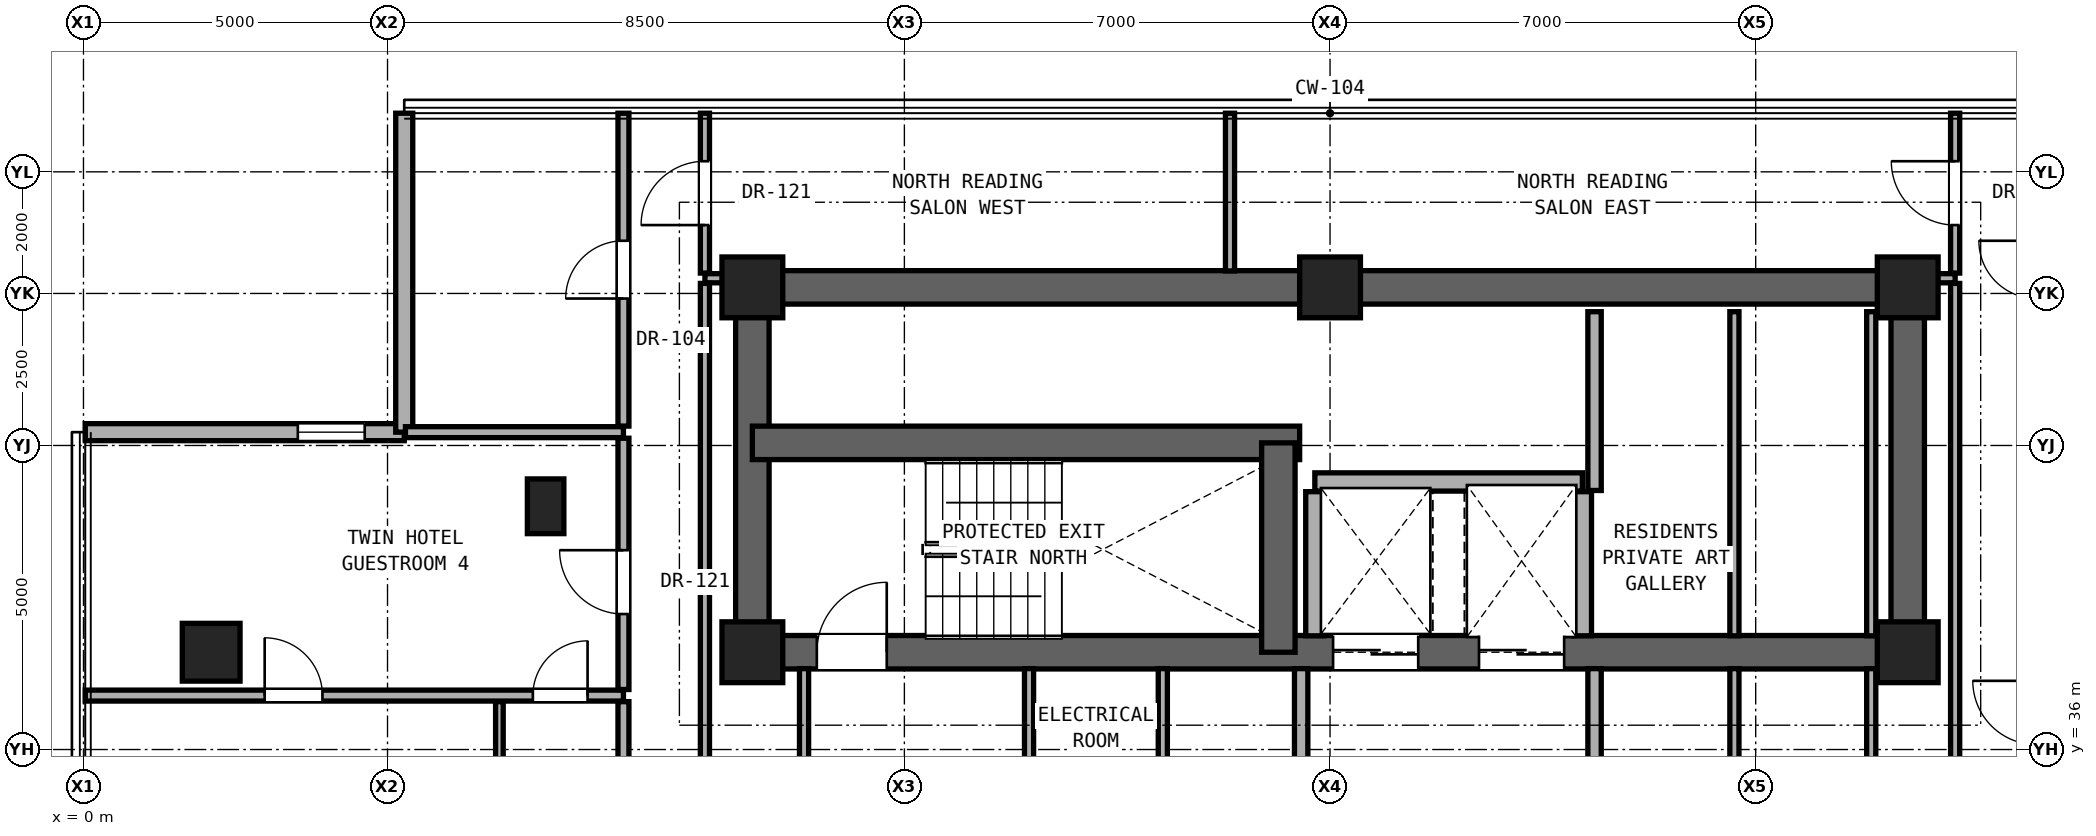
"""IFC4 building model, lengths in metres.
Left out: names, types, materials, properties, quantities, classifications, styles, units other than length and angle.
Written with IfcOpenShell. Run it as: python <this file> out.ifc"""

import sys

from ifc_helpers import new_model, si_unit, direction, frame, frame_2d, origin, origin_2d, place, context, subcontext, project, spatial, rectangle, hollow_rectangle, extrude, element, fill, save


model = new_model("IFC4")
c1 = context("Model", 3, precision=1e-05, world=origin(), true_north=direction((0.0, 1.0)))
c2 = subcontext(c1, "Body", "Model", "MODEL_VIEW")
j1 = project(units=[si_unit("LENGTHUNIT", "METRE"), si_unit("PLANEANGLEUNIT", "RADIAN")], contexts=[c1])
p1 = place(None, origin())
s1 = spatial("IfcSite", under=j1, at=p1, CompositionType="ELEMENT")
p2 = place(p1, origin())
s2 = spatial("IfcBuilding", under=s1, at=p2, CompositionType="ELEMENT")
p3 = place(p2, frame((0.0, 0.0, 164.15)))
s3 = spatial("IfcBuildingStorey", under=s2, at=p3, CompositionType="ELEMENT", Elevation=164.15)
for number, where, z_axis, x_axis in (
    (1, (11.0, 37.6, 0.0), (0.0, 0.0, 1.0), (1.0, 0.0, 0.0)),
    (2, (30.0, 37.6, 0.0), (0.0, 0.0, 1.0), (1.0, 0.0, 0.0)),
    (3, (11.0, 43.6, 0.0), (0.0, 0.0, 1.0), (1.0, 0.0, 0.0)),
    (4, (20.5, 43.6, 0.0), (0.0, 0.0, 1.0), (1.0, 0.0, 0.0)),
    (5, (30.0, 43.6, 0.0), (0.0, 0.0, 1.0), (1.0, 0.0, 0.0)),
):
    element("IfcColumn", number, at=place(p3, frame(where, z_axis=z_axis, x_axis=x_axis)), inside=s3, PredefinedType="COLUMN", context=c2, shape_type="SweptSolid", body=[
        extrude(rectangle(XDim=1.0, YDim=1.0, at=origin_2d()), origin(), (0.0, 0.0, 1.0), 3.25),
    ])
p4 = place(p3, frame((2.1, 37.6, 0.0), z_axis=(0.0, 0.0, 1.0), x_axis=(1.0, 0.0, 0.0)))
e6 = element("IfcColumn", 6, at=p4, inside=s3, PredefinedType="COLUMN", context=c2, shape_type="SweptSolid", body=[
    extrude(hollow_rectangle(XDim=0.95, YDim=0.95, WallThickness=0.05, at=origin_2d()), origin(), (0.0, 0.0, 1.0), 3.25),
])
p5 = place(p3, frame((7.6, 40.0, 0.0), z_axis=(0.0, 0.0, 1.0), x_axis=(1.0, 0.0, 0.0)))
e7 = element("IfcColumn", 7, at=p5, inside=s3, PredefinedType="PILASTER", context=c2, shape_type="SweptSolid", body=[
    extrude(rectangle(XDim=0.6, YDim=0.9, at=origin_2d()), origin(), (0.0, 0.0, 1.0), 3.25),
])
p6 = place(p3, frame((11.0, 43.6, 0.0), z_axis=(0.0, 0.0, 1.0), x_axis=(1.0, 0.0, 0.0)))
e8 = element("IfcWall", 8, at=p6, inside=s3, PredefinedType="SHEAR", context=c2, shape_type="SweptSolid", body=[
    extrude(rectangle(XDim=19.0, YDim=0.55, at=frame_2d((9.5, 0.0))), origin(), (0.0, 0.0, 1.0), 3.05),
])
for number, where, z_axis, x_axis in (
    (9, (11.0, 37.6, 0.0), (0.0, 0.0, 1.0), (0.0, 1.0, 0.0)),
    (10, (30.0, 37.6, 0.0), (0.0, 0.0, 1.0), (0.0, 1.0, 0.0)),
):
    element("IfcWall", number, at=place(p3, frame(where, z_axis=z_axis, x_axis=x_axis)), inside=s3, PredefinedType="SHEAR", context=c2, shape_type="SweptSolid", body=[
        extrude(rectangle(XDim=6.0, YDim=0.55, at=frame_2d((3.0, 0.0))), origin(), (0.0, 0.0, 1.0), 3.05),
    ])
p7 = place(p3, frame((11.0, 37.6, 0.0), z_axis=(0.0, 0.0, 1.0), x_axis=(1.0, 0.0, 0.0)))
e11 = element("IfcWall", 11, at=p7, inside=s3, PredefinedType="SHEAR", context=c2, shape_type="SweptSolid", body=[
    extrude(rectangle(XDim=19.0, YDim=0.55, at=frame_2d((9.5, 0.0))), origin(), (0.0, 0.0, 1.0), 3.05),
])
p8 = place(p7, frame((1.06, 0.0, 0.0)))
e12 = element("IfcOpeningElement", 12, at=p8, cuts=e11, PredefinedType="OPENING", context=c2, shape_type="SweptSolid", body=[
    extrude(rectangle(XDim=1.15, YDim=2.2, at=frame_2d((0.575, 1.1))), frame((0.0, 0.285, 0.0), z_axis=(0.0, -1.0, 0.0), x_axis=(1.0, 0.0, 0.0)), (0.0, 0.0, 1.0), 0.57),
])
p9 = place(p7, frame((9.55, 0.0, 0.0)))
e13 = element("IfcOpeningElement", 13, at=p9, cuts=e11, PredefinedType="OPENING", context=c2, shape_type="SweptSolid", body=[
    extrude(rectangle(XDim=1.4, YDim=2.35, at=frame_2d((0.7, 1.175))), frame((0.0, 0.285, 0.0), z_axis=(0.0, -1.0, 0.0), x_axis=(1.0, 0.0, 0.0)), (0.0, 0.0, 1.0), 0.57),
])
p10 = place(p7, frame((11.95, 0.0, 0.0)))
e14 = element("IfcOpeningElement", 14, at=p10, cuts=e11, PredefinedType="OPENING", context=c2, shape_type="SweptSolid", body=[
    extrude(rectangle(XDim=1.4, YDim=2.35, at=frame_2d((0.7, 1.175))), frame((0.0, 0.285, 0.0), z_axis=(0.0, -1.0, 0.0), x_axis=(1.0, 0.0, 0.0)), (0.0, 0.0, 1.0), 0.57),
])
p11 = place(p3, frame((11.0, 41.043, 0.0), z_axis=(0.0, 0.0, 1.0), x_axis=(1.0, 0.0, 0.0)))
e15 = element("IfcWall", 15, at=p11, inside=s3, PredefinedType="SHEAR", context=c2, shape_type="SweptSolid", body=[
    extrude(rectangle(XDim=9.0, YDim=0.55, at=frame_2d((4.5, 0.0))), origin(), (0.0, 0.0, 1.0), 3.05),
])
p12 = place(p3, frame((19.65, 37.6, 0.0), z_axis=(0.0, 0.0, 1.0), x_axis=(0.0, 1.0, 0.0)))
e16 = element("IfcWall", 16, at=p12, inside=s3, PredefinedType="SHEAR", context=c2, shape_type="SweptSolid", body=[
    extrude(rectangle(XDim=3.443, YDim=0.55, at=frame_2d((1.721, 0.0))), origin(), (0.0, 0.0, 1.0), 3.05),
])
p13 = place(p3, frame((5.275, 41.219, 0.0), z_axis=(0.0, 0.0, 1.0), x_axis=(-1.0, 0.0, 0.0)))
e17 = element("IfcWall", 17, at=p13, inside=s3, PredefinedType="SOLIDWALL", context=c2, shape_type="SweptSolid", body=[
    extrude(rectangle(XDim=5.245, YDim=0.28, at=frame_2d((2.623, 0.0))), origin(), (0.0, 0.0, 1.0), 3.03),
])
p14 = place(p13, frame((0.65, 0.0, 0.85)))
e18 = element("IfcOpeningElement", 18, at=p14, cuts=e17, PredefinedType="OPENING", context=c2, shape_type="SweptSolid", body=[
    extrude(rectangle(XDim=1.1, YDim=2.0, at=frame_2d((0.55, 1.0))), frame((0.0, 0.15, 0.0), z_axis=(0.0, -1.0, 0.0), x_axis=(1.0, 0.0, 0.0)), (0.0, 0.0, 1.0), 0.3),
])
p15 = place(p3, frame((5.275, 46.464, 0.0), z_axis=(0.0, 0.0, 1.0), x_axis=(0.0, -1.0, 0.0)))
e19 = element("IfcWall", 19, at=p15, inside=s3, PredefinedType="SOLIDWALL", context=c2, shape_type="SweptSolid", body=[
    extrude(rectangle(XDim=5.245, YDim=0.28, at=frame_2d((2.623, 0.0))), origin(), (0.0, 0.0, 1.0), 3.03),
])
p16 = place(p3, frame((0.03, 36.887, 0.0), z_axis=(0.0, 0.0, 1.0), x_axis=(1.0, 0.0, 0.0)))
e20 = element("IfcWall", 20, at=p16, inside=s3, PredefinedType="PARTITIONING", context=c2, shape_type="SweptSolid", body=[
    extrude(rectangle(XDim=8.85, YDim=0.18, at=frame_2d((4.425, 0.0))), origin(), (0.0, 0.0, 1.0), 2.269),
])
p17 = place(p16, frame((2.95, 0.0, 0.0)))
e21 = element("IfcOpeningElement", 21, at=p17, cuts=e20, PredefinedType="OPENING", context=c2, shape_type="SweptSolid", body=[
    extrude(rectangle(XDim=0.95, YDim=2.15, at=frame_2d((0.475, 1.075))), frame((0.0, 0.1, 0.0), z_axis=(0.0, -1.0, 0.0), x_axis=(1.0, 0.0, 0.0)), (0.0, 0.0, 1.0), 0.2),
])
p18 = place(p16, frame((7.36, 0.0, 0.0)))
e22 = element("IfcOpeningElement", 22, at=p18, cuts=e20, PredefinedType="OPENING", context=c2, shape_type="SweptSolid", body=[
    extrude(rectangle(XDim=0.9, YDim=2.1, at=frame_2d((0.45, 1.05))), frame((0.0, 0.1, 0.0), z_axis=(0.0, -1.0, 0.0), x_axis=(1.0, 0.0, 0.0)), (0.0, 0.0, 1.0), 0.2),
])
p19 = place(p3, frame((20.25, 40.4, 0.0), z_axis=(0.0, 0.0, 1.0), x_axis=(1.0, 0.0, 0.0)))
e23 = element("IfcWall", 23, at=p19, inside=s3, PredefinedType="SOLIDWALL", context=c2, shape_type="SweptSolid", body=[
    extrude(rectangle(XDim=4.4, YDim=0.3, at=frame_2d((2.2, 0.0))), origin(), (0.0, 0.0, 1.0), 3.05),
])
p20 = place(p3, frame((5.295, 41.219, 0.0), z_axis=(0.0, 0.0, 1.0), x_axis=(1.0, 0.0, 0.0)))
e24 = element("IfcWall", 24, at=p20, inside=s3, PredefinedType="PARTITIONING", context=c2, shape_type="SweptSolid", body=[
    extrude(rectangle(XDim=3.585, YDim=0.18, at=frame_2d((1.792, 0.0))), origin(), (0.0, 0.0, 1.0), 3.05),
])
for number, where, z_axis, x_axis in (
    (25, (10.22, 43.75, 0.0), (0.0, 0.0, 1.0), (1.0, 0.0, 0.0)),
    (26, (30.27, 43.75, 0.0), (0.0, 0.0, 1.0), (1.0, 0.0, 0.0)),
):
    element("IfcWall", number, at=place(p3, frame(where, z_axis=z_axis, x_axis=x_axis)), inside=s3, PredefinedType="PARTITIONING", context=c2, shape_type="SweptSolid", body=[
        extrude(rectangle(XDim=0.51, YDim=0.15, at=frame_2d((0.255, 0.0))), origin(), (0.0, 0.0, 1.0), 3.05),
    ])
p21 = place(p3, frame((6.84, 34.267, 0.0), z_axis=(0.0, 0.0, 1.0), x_axis=(0.0, 1.0, 0.0)))
e27 = element("IfcWall", 27, at=p21, inside=s3, PredefinedType="PARTITIONING", context=c2, shape_type="SweptSolid", body=[
    extrude(rectangle(XDim=2.52, YDim=0.125, at=frame_2d((1.26, 0.0))), origin(), (0.0, 0.0, 1.0), 3.05),
])
p22 = place(p3, frame((8.88, 34.267, 0.0), z_axis=(0.0, 0.0, 1.0), x_axis=(0.0, 1.0, 0.0)))
e28 = element("IfcWall", 28, at=p22, inside=s3, PredefinedType="PARTITIONING", context=c2, shape_type="SweptSolid", body=[
    extrude(rectangle(XDim=2.52, YDim=0.18, at=frame_2d((1.26, 0.0))), origin(), (0.0, 0.0, 1.0), 3.05),
])
p23 = place(p3, frame((8.88, 36.987, 0.0), z_axis=(0.0, 0.0, 1.0), x_axis=(0.0, 1.0, 0.0)))
e29 = element("IfcWall", 29, at=p23, inside=s3, PredefinedType="PARTITIONING", context=c2, shape_type="SweptSolid", body=[
    extrude(rectangle(XDim=4.132, YDim=0.18, at=frame_2d((2.066, 0.0))), origin(), (0.0, 0.0, 1.0), 2.442),
])
p24 = place(p23, frame((1.241, 0.0, 0.0)))
e30 = element("IfcOpeningElement", 30, at=p24, cuts=e29, PredefinedType="OPENING", context=c2, shape_type="SweptSolid", body=[
    extrude(rectangle(XDim=1.05, YDim=2.2, at=frame_2d((0.525, 1.1))), frame((0.0, 0.1, 0.0), z_axis=(0.0, -1.0, 0.0), x_axis=(1.0, 0.0, 0.0)), (0.0, 0.0, 1.0), 0.2),
])
p25 = place(p3, frame((8.88, 41.319, 0.0), z_axis=(0.0, 0.0, 1.0), x_axis=(0.0, 1.0, 0.0)))
e31 = element("IfcWall", 31, at=p25, inside=s3, PredefinedType="PARTITIONING", context=c2, shape_type="SweptSolid", body=[
    extrude(rectangle(XDim=5.145, YDim=0.18, at=frame_2d((2.573, 0.0))), origin(), (0.0, 0.0, 1.0), 3.05),
])
p26 = place(p25, frame((2.097, 0.0, 0.0)))
e32 = element("IfcOpeningElement", 32, at=p26, cuts=e31, PredefinedType="OPENING", context=c2, shape_type="SweptSolid", body=[
    extrude(rectangle(XDim=0.95, YDim=2.15, at=frame_2d((0.475, 1.075))), frame((0.0, 0.1, 0.0), z_axis=(0.0, -1.0, 0.0), x_axis=(1.0, 0.0, 0.0)), (0.0, 0.0, 1.0), 0.2),
])
p27 = place(p3, frame((10.22, 34.535, 0.0), z_axis=(0.0, 0.0, 1.0), x_axis=(0.0, 1.0, 0.0)))
e33 = element("IfcWall", 33, at=p27, inside=s3, PredefinedType="PARTITIONING", context=c2, shape_type="SweptSolid", body=[
    extrude(rectangle(XDim=9.13, YDim=0.15, at=frame_2d((4.565, 0.0))), origin(), (0.0, 0.0, 1.0), 2.442),
])
p28 = place(p3, frame((10.22, 43.835, 0.0), z_axis=(0.0, 0.0, 1.0), x_axis=(0.0, 1.0, 0.0)))
e34 = element("IfcWall", 34, at=p28, inside=s3, PredefinedType="PARTITIONING", context=c2, shape_type="SweptSolid", body=[
    extrude(rectangle(XDim=2.629, YDim=0.15, at=frame_2d((1.314, 0.0))), origin(), (0.0, 0.0, 1.0), 3.05),
])
p29 = place(p28, frame((0.79, 0.0, 0.0)))
e35 = element("IfcOpeningElement", 35, at=p29, cuts=e34, PredefinedType="OPENING", context=c2, shape_type="SweptSolid", body=[
    extrude(rectangle(XDim=1.05, YDim=2.2, at=frame_2d((0.525, 1.1))), frame((0.0, 0.085, 0.0), z_axis=(0.0, -1.0, 0.0), x_axis=(1.0, 0.0, 0.0)), (0.0, 0.0, 1.0), 0.17),
])
p30 = place(p3, frame((11.85, 34.535, 0.0), z_axis=(0.0, 0.0, 1.0), x_axis=(0.0, 1.0, 0.0)))
e36 = element("IfcWall", 36, at=p30, inside=s3, PredefinedType="PARTITIONING", context=c2, shape_type="SweptSolid", body=[
    extrude(rectangle(XDim=2.795, YDim=0.15, at=frame_2d((1.397, 0.0))), origin(), (0.0, 0.0, 1.0), 3.05),
])
for number, where, z_axis, x_axis in (
    (37, (15.55, 34.57, 0.0), (0.0, 0.0, 1.0), (0.0, 1.0, 0.0)),
    (38, (17.75, 34.57, 0.0), (0.0, 0.0, 1.0), (0.0, 1.0, 0.0)),
):
    element("IfcWall", number, at=place(p3, frame(where, z_axis=z_axis, x_axis=x_axis)), inside=s3, PredefinedType="PARTITIONING", context=c2, shape_type="SweptSolid", body=[
        extrude(rectangle(XDim=2.76, YDim=0.15, at=frame_2d((1.38, 0.0))), origin(), (0.0, 0.0, 1.0), 3.05),
    ])
p31 = place(p3, frame((18.855, 43.87, 0.0), z_axis=(0.0, 0.0, 1.0), x_axis=(0.0, 1.0, 0.0)))
e39 = element("IfcWall", 39, at=p31, inside=s3, PredefinedType="PARTITIONING", context=c2, shape_type="SweptSolid", body=[
    extrude(rectangle(XDim=2.594, YDim=0.15, at=frame_2d((1.297, 0.0))), origin(), (0.0, 0.0, 1.0), 3.05),
])
p32 = place(p3, frame((20.025, 34.57, 0.0), z_axis=(0.0, 0.0, 1.0), x_axis=(0.0, 1.0, 0.0)))
e40 = element("IfcWall", 40, at=p32, inside=s3, PredefinedType="SOLIDWALL", context=c2, shape_type="SweptSolid", body=[
    extrude(rectangle(XDim=2.76, YDim=0.22, at=frame_2d((1.38, 0.0))), origin(), (0.0, 0.0, 1.0), 3.05),
])
for number, where, z_axis, x_axis in (
    (41, (20.25, 37.87, 0.0), (0.0, 0.0, 1.0), (0.0, 1.0, 0.0)),
    (42, (24.65, 37.87, 0.0), (0.0, 0.0, 1.0), (0.0, 1.0, 0.0)),
):
    element("IfcWall", number, at=place(p3, frame(where, z_axis=z_axis, x_axis=x_axis)), inside=s3, PredefinedType="SOLIDWALL", context=c2, shape_type="SweptSolid", body=[
        extrude(rectangle(XDim=2.37, YDim=0.3, at=frame_2d((1.185, 0.0))), origin(), (0.0, 0.0, 1.0), 3.05),
    ])
p33 = place(p3, frame((24.85, 34.57, 0.0), z_axis=(0.0, 0.0, 1.0), x_axis=(0.0, 1.0, 0.0)))
e43 = element("IfcWall", 43, at=p33, inside=s3, PredefinedType="SOLIDWALL", context=c2, shape_type="SweptSolid", body=[
    extrude(rectangle(XDim=2.76, YDim=0.22, at=frame_2d((1.38, 0.0))), origin(), (0.0, 0.0, 1.0), 3.05),
])
p34 = place(p3, frame((24.85, 40.26, 0.0), z_axis=(0.0, 0.0, 1.0), x_axis=(0.0, 1.0, 0.0)))
e44 = element("IfcWall", 44, at=p34, inside=s3, PredefinedType="SOLIDWALL", context=c2, shape_type="SweptSolid", body=[
    extrude(rectangle(XDim=2.94, YDim=0.22, at=frame_2d((1.47, 0.0))), origin(), (0.0, 0.0, 1.0), 3.05),
])
p35 = place(p3, frame((27.15, 34.57, 0.0), z_axis=(0.0, 0.0, 1.0), x_axis=(0.0, 1.0, 0.0)))
e45 = element("IfcWall", 45, at=p35, inside=s3, PredefinedType="PARTITIONING", context=c2, shape_type="SweptSolid", body=[
    extrude(rectangle(XDim=2.76, YDim=0.15, at=frame_2d((1.38, 0.0))), origin(), (0.0, 0.0, 1.0), 3.05),
])
p36 = place(p3, frame((27.15, 37.87, 0.0), z_axis=(0.0, 0.0, 1.0), x_axis=(0.0, 1.0, 0.0)))
e46 = element("IfcWall", 46, at=p36, inside=s3, PredefinedType="PARTITIONING", context=c2, shape_type="SweptSolid", body=[
    extrude(rectangle(XDim=5.33, YDim=0.15, at=frame_2d((2.665, 0.0))), origin(), (0.0, 0.0, 1.0), 3.05),
])
p37 = place(p3, frame((29.4, 34.57, 0.0), z_axis=(0.0, 0.0, 1.0), x_axis=(0.0, 1.0, 0.0)))
e47 = element("IfcWall", 47, at=p37, inside=s3, PredefinedType="PARTITIONING", context=c2, shape_type="SweptSolid", body=[
    extrude(rectangle(XDim=2.76, YDim=0.15, at=frame_2d((1.38, 0.0))), origin(), (0.0, 0.0, 1.0), 3.05),
])
p38 = place(p3, frame((29.4, 37.87, 0.0), z_axis=(0.0, 0.0, 1.0), x_axis=(0.0, 1.0, 0.0)))
e48 = element("IfcWall", 48, at=p38, inside=s3, PredefinedType="PARTITIONING", context=c2, shape_type="SweptSolid", body=[
    extrude(rectangle(XDim=5.33, YDim=0.15, at=frame_2d((2.665, 0.0))), origin(), (0.0, 0.0, 1.0), 3.05),
])
p39 = place(p3, frame((30.78, 34.57, 0.0), z_axis=(0.0, 0.0, 1.0), x_axis=(0.0, 1.0, 0.0)))
e49 = element("IfcWall", 49, at=p39, inside=s3, PredefinedType="PARTITIONING", context=c2, shape_type="SweptSolid", body=[
    extrude(rectangle(XDim=9.095, YDim=0.15, at=frame_2d((4.547, 0.0))), origin(), (0.0, 0.0, 1.0), 2.442),
])
p40 = place(p3, frame((30.78, 43.835, 0.0), z_axis=(0.0, 0.0, 1.0), x_axis=(0.0, 1.0, 0.0)))
e50 = element("IfcWall", 50, at=p40, inside=s3, PredefinedType="PARTITIONING", context=c2, shape_type="SweptSolid", body=[
    extrude(rectangle(XDim=2.629, YDim=0.15, at=frame_2d((1.314, 0.0))), origin(), (0.0, 0.0, 1.0), 3.05),
])
p41 = place(p40, frame((0.79, 0.0, 0.0)))
e51 = element("IfcOpeningElement", 51, at=p41, cuts=e50, PredefinedType="OPENING", context=c2, shape_type="SweptSolid", body=[
    extrude(rectangle(XDim=1.05, YDim=2.2, at=frame_2d((0.525, 1.1))), frame((0.0, 0.085, 0.0), z_axis=(0.0, -1.0, 0.0), x_axis=(1.0, 0.0, 0.0)), (0.0, 0.0, 1.0), 0.17),
])
p42 = place(p14, origin())
e52 = element("IfcWindow", 52, at=p42, inside=s3, PartitioningType="SINGLE_PANEL", PredefinedType="WINDOW", context=c2, shape_type="SweptSolid", body=[
    extrude(rectangle(XDim=1.1, YDim=2.0, at=frame_2d((0.55, 1.0))), frame((0.0, 0.03, 0.0), z_axis=(0.0, -1.0, 0.0), x_axis=(1.0, 0.0, 0.0)), (0.0, 0.0, 1.0), 0.06),
])
fill(e18, e52)
p43 = place(p8, origin())
e53 = element("IfcDoor", 53, at=p43, inside=s3, OperationType="SINGLE_SWING_RIGHT", PredefinedType="DOOR", context=c2, shape_type="SweptSolid", body=[
    extrude(rectangle(XDim=1.15, YDim=2.2, at=frame_2d((0.575, 1.1))), frame((0.0, 0.025, 0.0), z_axis=(0.0, -1.0, 0.0), x_axis=(1.0, 0.0, 0.0)), (0.0, 0.0, 1.0), 0.05),
])
fill(e12, e53)
p44 = place(p24, origin())
e54 = element("IfcDoor", 54, at=p44, inside=s3, OperationType="SINGLE_SWING_RIGHT", PredefinedType="DOOR", context=c2, shape_type="SweptSolid", body=[
    extrude(rectangle(XDim=1.05, YDim=2.2, at=frame_2d((0.525, 1.1))), frame((0.0, 0.025, 0.0), z_axis=(0.0, -1.0, 0.0), x_axis=(1.0, 0.0, 0.0)), (0.0, 0.0, 1.0), 0.05),
])
fill(e30, e54)
p45 = place(p17, origin())
e55 = element("IfcDoor", 55, at=p45, inside=s3, OperationType="SINGLE_SWING_LEFT", PredefinedType="DOOR", context=c2, shape_type="SweptSolid", body=[
    extrude(rectangle(XDim=0.95, YDim=2.15, at=frame_2d((0.475, 1.075))), frame((0.0, 0.025, 0.0), z_axis=(0.0, -1.0, 0.0), x_axis=(1.0, 0.0, 0.0)), (0.0, 0.0, 1.0), 0.05),
])
fill(e21, e55)
p46 = place(p18, origin())
e56 = element("IfcDoor", 56, at=p46, inside=s3, OperationType="SINGLE_SWING_RIGHT", PredefinedType="DOOR", context=c2, shape_type="SweptSolid", body=[
    extrude(rectangle(XDim=0.9, YDim=2.1, at=frame_2d((0.45, 1.05))), frame((0.0, 0.025, 0.0), z_axis=(0.0, -1.0, 0.0), x_axis=(1.0, 0.0, 0.0)), (0.0, 0.0, 1.0), 0.05),
])
fill(e22, e56)
p47 = place(p29, origin())
e57 = element("IfcDoor", 57, at=p47, inside=s3, OperationType="SINGLE_SWING_LEFT", PredefinedType="DOOR", context=c2, shape_type="SweptSolid", body=[
    extrude(rectangle(XDim=1.05, YDim=2.2, at=frame_2d((0.525, 1.1))), frame((0.0, 0.025, 0.0), z_axis=(0.0, -1.0, 0.0), x_axis=(1.0, 0.0, 0.0)), (0.0, 0.0, 1.0), 0.05),
])
fill(e35, e57)
p48 = place(p41, origin())
e58 = element("IfcDoor", 58, at=p48, inside=s3, OperationType="SINGLE_SWING_RIGHT", PredefinedType="DOOR", context=c2, shape_type="SweptSolid", body=[
    extrude(rectangle(XDim=1.05, YDim=2.2, at=frame_2d((0.525, 1.1))), frame((0.0, 0.025, 0.0), z_axis=(0.0, -1.0, 0.0), x_axis=(1.0, 0.0, 0.0)), (0.0, 0.0, 1.0), 0.05),
])
fill(e51, e58)
p49 = place(p26, origin())
e59 = element("IfcDoor", 59, at=p49, inside=s3, OperationType="SINGLE_SWING_LEFT", PredefinedType="DOOR", context=c2, shape_type="SweptSolid", body=[
    extrude(rectangle(XDim=0.95, YDim=2.15, at=frame_2d((0.475, 1.075))), frame((0.0, 0.025, 0.0), z_axis=(0.0, -1.0, 0.0), x_axis=(1.0, 0.0, 0.0)), (0.0, 0.0, 1.0), 0.05),
])
fill(e32, e59)
p50 = place(p9, origin())
e60 = element("IfcDoor", 60, at=p50, inside=s3, OperationType="DOUBLE_DOOR_SLIDING", PredefinedType="DOOR", context=c2, shape_type="SweptSolid", body=[
    extrude(rectangle(XDim=1.4, YDim=2.35, at=frame_2d((0.7, 1.175))), frame((0.0, 0.025, 0.0), z_axis=(0.0, -1.0, 0.0), x_axis=(1.0, 0.0, 0.0)), (0.0, 0.0, 1.0), 0.05),
])
fill(e13, e60)
p51 = place(p10, origin())
e61 = element("IfcDoor", 61, at=p51, inside=s3, OperationType="DOUBLE_DOOR_SLIDING", PredefinedType="DOOR", context=c2, shape_type="SweptSolid", body=[
    extrude(rectangle(XDim=1.4, YDim=2.35, at=frame_2d((0.7, 1.175))), frame((0.0, 0.025, 0.0), z_axis=(0.0, -1.0, 0.0), x_axis=(1.0, 0.0, 0.0)), (0.0, 0.0, 1.0), 0.05),
])
fill(e14, e61)
save(model, sys.argv[1])
